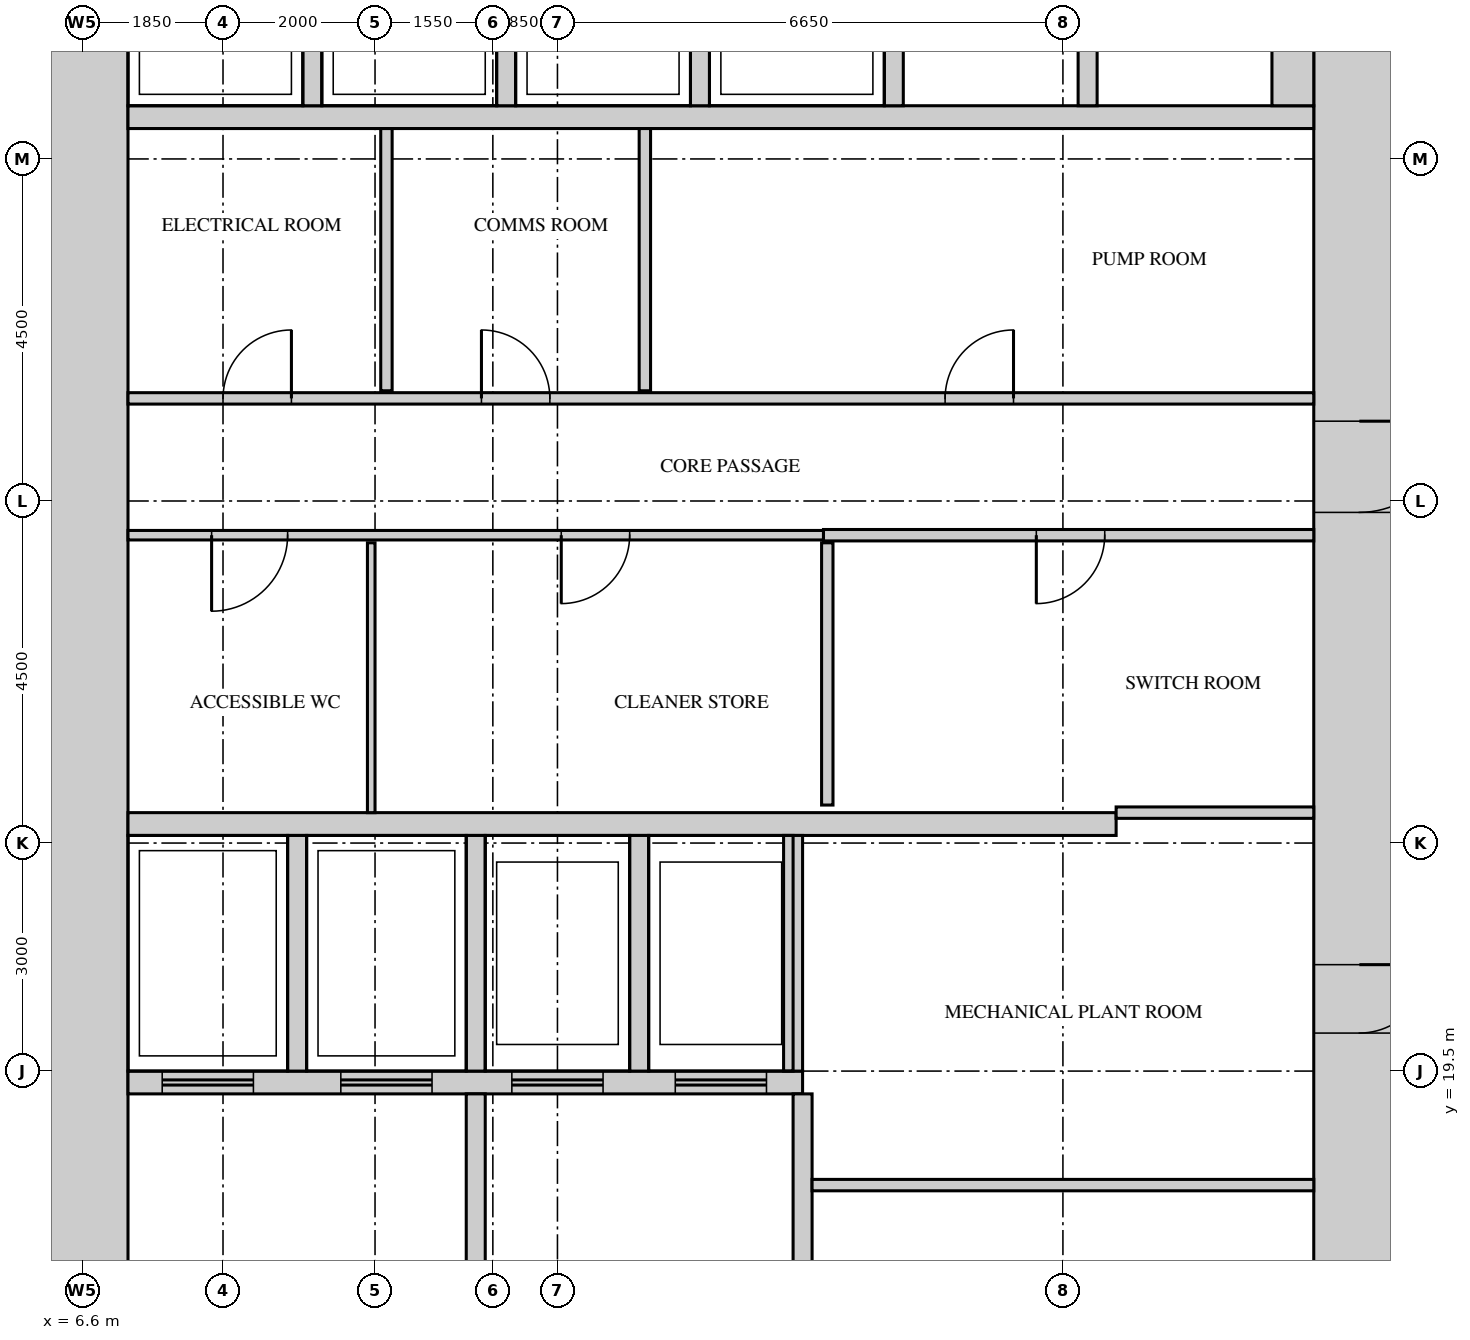
"""IFC4 building model, lengths in metres.
Left out: names, types, materials, properties, quantities, classifications, styles, units other than length and angle.
Written with IfcOpenShell. Run it as: python <this file> out.ifc"""

import sys

from ifc_helpers import new_model, si_unit, direction, frame, frame_2d, origin, place, context, subcontext, project, spatial, rectangle, extrude, source, transform, mapped, element, fill, save


model = new_model("IFC4")
c1 = context("Model", 3, precision=1e-05, world=origin(), true_north=direction((0.0, 1.0)))
c2 = subcontext(c1, "Body", "Model", "MODEL_VIEW")
j1 = project(units=[si_unit("LENGTHUNIT", "METRE"), si_unit("PLANEANGLEUNIT", "RADIAN")], contexts=[c1])
p1 = place(None, origin())
s1 = spatial("IfcSite", under=j1, at=p1, CompositionType="ELEMENT")
p2 = place(p1, origin())
s2 = spatial("IfcBuilding", under=s1, at=p2, CompositionType="ELEMENT")
p3 = place(p2, frame((0.0, 0.0, 33.0)))
s3 = spatial("IfcBuildingStorey", under=s2, at=p3, CompositionType="ELEMENT", Elevation=33.0)
m1 = source(origin(), c2, "Body", "SweptSolid", [
    extrude(rectangle(XDim=27.6, YDim=1.2, at=frame_2d((13.8, 0.0))), origin(), (0.0, 0.0, 1.0), 4.2),
])
p4 = place(p3, frame((23.4, 13.2, 0.0), z_axis=(0.0, 0.0, 1.0), x_axis=(0.0, 1.0, 0.0)))
e1 = element("IfcWall", 1, at=p4, inside=s3, PredefinedType="SHEAR", context=c2, shape_type="MappedRepresentation", body=[
    mapped(m1, transform((0.0, 0.0, 0.0))),
])
m2 = source(origin(), c2, "Body", "SweptSolid", [
    extrude(rectangle(XDim=1.8, YDim=2.1, at=frame_2d((0.9, 1.05))), frame((0.0, 0.61, 0.0), z_axis=(0.0, -1.0, 0.0), x_axis=(1.0, 0.0, 0.0)), (0.0, 0.0, 1.0), 1.22),
])
p5 = place(p4, frame((22.4, 0.0, 0.0)))
e2 = element("IfcOpeningElement", 2, at=p5, cuts=e1, PredefinedType="OPENING", context=c2, shape_type="MappedRepresentation", body=[
    mapped(m2, transform((0.0, 0.0, 0.0))),
])
m3 = source(origin(), c2, "Body", "SweptSolid", [
    extrude(rectangle(XDim=1.2, YDim=2.1, at=frame_2d((0.6, 1.05))), frame((0.0, 0.61, 0.0), z_axis=(0.0, -1.0, 0.0), x_axis=(1.0, 0.0, 0.0)), (0.0, 0.0, 1.0), 1.22),
])
p6 = place(p4, frame((13.65, 0.0, 0.0)))
e3 = element("IfcOpeningElement", 3, at=p6, cuts=e1, PredefinedType="OPENING", context=c2, shape_type="MappedRepresentation", body=[
    mapped(m3, transform((0.0, 0.0, 0.0))),
])
m4 = source(origin(), c2, "Body", "SweptSolid", [
    extrude(rectangle(XDim=0.9, YDim=2.1, at=frame_2d((0.45, 1.05))), frame((0.0, 0.61, 0.0), z_axis=(0.0, -1.0, 0.0), x_axis=(1.0, 0.0, 0.0)), (0.0, 0.0, 1.0), 1.22),
])
p7 = place(p4, frame((1.95, 0.0, 0.0)))
e4 = element("IfcOpeningElement", 4, at=p7, cuts=e1, PredefinedType="OPENING", context=c2, shape_type="MappedRepresentation", body=[
    mapped(m4, transform((0.0, 0.0, 0.0))),
])
p8 = place(p4, frame((6.8, 0.0, 0.0)))
e5 = element("IfcOpeningElement", 5, at=p8, cuts=e1, PredefinedType="OPENING", context=c2, shape_type="MappedRepresentation", body=[
    mapped(m4, transform((0.0, 0.0, 0.0))),
])
p9 = place(p3, frame((6.6, 13.2, 0.0), z_axis=(0.0, 0.0, 1.0), x_axis=(0.0, 1.0, 0.0)))
e6 = element("IfcWall", 6, at=p9, inside=s3, PredefinedType="SHEAR", context=c2, shape_type="MappedRepresentation", body=[
    mapped(m1, transform((0.0, 0.0, 0.0))),
])
m5 = source(origin(), c2, "Body", "SweptSolid", [
    extrude(rectangle(XDim=13.0, YDim=0.3, at=frame_2d((6.5, 0.0))), origin(), (0.0, 0.0, 1.0), 4.2),
])
p10 = place(p3, frame((7.2, 22.75, 0.0), z_axis=(0.0, 0.0, 1.0), x_axis=(1.0, 0.0, 0.0)))
e7 = element("IfcWall", 7, at=p10, inside=s3, PredefinedType="STANDARD", context=c2, shape_type="MappedRepresentation", body=[
    mapped(m5, transform((0.0, 0.0, 0.0))),
])
m6 = source(origin(), c2, "Body", "SweptSolid", [
    extrude(rectangle(XDim=8.875, YDim=0.3, at=frame_2d((4.438, 0.0))), origin(), (0.0, 0.0, 1.0), 4.2),
])
p11 = place(p3, frame((7.2, 19.35, 0.0), z_axis=(0.0, 0.0, 1.0), x_axis=(1.0, 0.0, 0.0)))
e8 = element("IfcWall", 8, at=p11, inside=s3, PredefinedType="STANDARD", context=c2, shape_type="MappedRepresentation", body=[
    mapped(m6, transform((0.0, 0.0, 0.0))),
])
m7 = source(origin(), c2, "Body", "SweptSolid", [
    extrude(rectangle(XDim=1.2, YDim=2.1, at=frame_2d((0.6, 1.05))), frame((0.0, 0.16, 0.0), z_axis=(0.0, -1.0, 0.0), x_axis=(1.0, 0.0, 0.0)), (0.0, 0.0, 1.0), 0.32),
])
p12 = place(p11, frame((0.45, 0.0, 0.0)))
e9 = element("IfcOpeningElement", 9, at=p12, cuts=e8, PredefinedType="OPENING", context=c2, shape_type="MappedRepresentation", body=[
    mapped(m7, transform((0.0, 0.0, 0.0))),
])
p13 = place(p11, frame((2.8, 0.0, 0.0)))
e10 = element("IfcOpeningElement", 10, at=p13, cuts=e8, PredefinedType="OPENING", context=c2, shape_type="MappedRepresentation", body=[
    mapped(m7, transform((0.0, 0.0, 0.0))),
])
p14 = place(p11, frame((5.05, 0.0, 0.0)))
e11 = element("IfcOpeningElement", 11, at=p14, cuts=e8, PredefinedType="OPENING", context=c2, shape_type="MappedRepresentation", body=[
    mapped(m7, transform((0.0, 0.0, 0.0))),
])
p15 = place(p11, frame((7.2, 0.0, 0.0)))
e12 = element("IfcOpeningElement", 12, at=p15, cuts=e8, PredefinedType="OPENING", context=c2, shape_type="MappedRepresentation", body=[
    mapped(m7, transform((0.0, 0.0, 0.0))),
])
m8 = source(origin(), c2, "Body", "SweptSolid", [
    extrude(rectangle(XDim=15.6, YDim=0.3, at=frame_2d((7.8, 0.0))), origin(), (0.0, 0.0, 1.0), 4.2),
])
p16 = place(p3, frame((7.2, 32.05, 0.0), z_axis=(0.0, 0.0, 1.0), x_axis=(1.0, 0.0, 0.0)))
e13 = element("IfcWall", 13, at=p16, inside=s3, PredefinedType="STANDARD", context=c2, shape_type="MappedRepresentation", body=[
    mapped(m8, transform((0.0, 0.0, 0.0))),
])
m9 = source(origin(), c2, "Body", "SweptSolid", [
    extrude(rectangle(XDim=3.1, YDim=0.25, at=frame_2d((1.55, 0.0))), origin(), (0.0, 0.0, 1.0), 4.2),
])
for number, where, z_axis, x_axis in (
    (14, (9.425, 19.5, 0.0), (0.0, 0.0, 1.0), (0.0, 1.0, 0.0)),
    (15, (11.775, 19.5, 0.0), (0.0, 0.0, 1.0), (0.0, 1.0, 0.0)),
    (16, (13.925, 19.5, 0.0), (0.0, 0.0, 1.0), (0.0, 1.0, 0.0)),
    (17, (15.95, 19.5, 0.0), (0.0, 0.0, 1.0), (0.0, 1.0, 0.0)),
):
    element("IfcWall", number, at=place(p3, frame(where, z_axis=z_axis, x_axis=x_axis)), inside=s3, PredefinedType="STANDARD", context=c2, shape_type="MappedRepresentation", body=[
        mapped(m9, transform((0.0, 0.0, 0.0))),
    ])
m10 = source(origin(), c2, "Body", "SweptSolid", [
    extrude(rectangle(XDim=2.4, YDim=0.25, at=frame_2d((1.2, 0.0))), origin(), (0.0, 0.0, 1.0), 4.2),
])
for number, where, z_axis, x_axis in (
    (18, (9.625, 32.2, 0.0), (0.0, 0.0, 1.0), (0.0, 1.0, 0.0)),
    (19, (12.175, 32.2, 0.0), (0.0, 0.0, 1.0), (0.0, 1.0, 0.0)),
    (20, (14.725, 32.2, 0.0), (0.0, 0.0, 1.0), (0.0, 1.0, 0.0)),
    (21, (17.275, 32.2, 0.0), (0.0, 0.0, 1.0), (0.0, 1.0, 0.0)),
    (22, (19.825, 32.2, 0.0), (0.0, 0.0, 1.0), (0.0, 1.0, 0.0)),
):
    element("IfcWall", number, at=place(p3, frame(where, z_axis=z_axis, x_axis=x_axis)), inside=s3, PredefinedType="STANDARD", context=c2, shape_type="MappedRepresentation", body=[
        mapped(m10, transform((0.0, 0.0, 0.0))),
    ])
m11 = source(origin(), c2, "Body", "SweptSolid", [
    extrude(rectangle(XDim=2.4, YDim=0.55, at=frame_2d((1.2, 0.0))), origin(), (0.0, 0.0, 1.0), 4.2),
])
p17 = place(p3, frame((22.525, 32.2, 0.0), z_axis=(0.0, 0.0, 1.0), x_axis=(0.0, 1.0, 0.0)))
e23 = element("IfcWall", 23, at=p17, inside=s3, PredefinedType="STANDARD", context=c2, shape_type="MappedRepresentation", body=[
    mapped(m11, transform((0.0, 0.0, 0.0))),
])
m12 = source(origin(), c2, "Body", "SweptSolid", [
    extrude(rectangle(XDim=3.4, YDim=0.25, at=frame_2d((1.7, 0.0))), origin(), (0.0, 0.0, 1.0), 4.2),
])
for number, where, z_axis, x_axis in (
    (24, (16.075, 15.8, 0.0), (0.0, 0.0, 1.0), (0.0, 1.0, 0.0)),
    (25, (11.775, 15.8, 0.0), (0.0, 0.0, 1.0), (0.0, 1.0, 0.0)),
):
    element("IfcWall", number, at=place(p3, frame(where, z_axis=z_axis, x_axis=x_axis)), inside=s3, PredefinedType="STANDARD", context=c2, shape_type="MappedRepresentation", body=[
        mapped(m12, transform((0.0, 0.0, 0.0))),
    ])
m13 = source(origin(), c2, "Body", "SweptSolid", [
    extrude(rectangle(XDim=6.6, YDim=0.15, at=frame_2d((3.3, 0.0))), origin(), (0.0, 0.0, 1.0), 4.3),
])
p18 = place(p3, frame((16.2, 18.0, 0.0), z_axis=(0.0, 0.0, 1.0), x_axis=(1.0, 0.0, 0.0)))
e26 = element("IfcWall", 26, at=p18, inside=s3, PredefinedType="PARTITIONING", context=c2, shape_type="MappedRepresentation", body=[
    mapped(m13, transform((0.0, 0.0, 0.0))),
])
m14 = source(origin(), c2, "Body", "SweptSolid", [
    extrude(rectangle(XDim=3.55, YDim=0.1, at=frame_2d((1.775, 0.0))), origin(), (0.0, 0.0, 1.0), 4.3),
])
p19 = place(p3, frame((10.4, 22.9, 0.0), z_axis=(0.0, 0.0, 1.0), x_axis=(0.0, 1.0, 0.0)))
e27 = element("IfcWall", 27, at=p19, inside=s3, PredefinedType="PARTITIONING", context=c2, shape_type="MappedRepresentation", body=[
    mapped(m14, transform((0.0, 0.0, 0.0))),
])
m15 = source(origin(), c2, "Body", "SweptSolid", [
    extrude(rectangle(XDim=2.6, YDim=0.15, at=frame_2d((1.3, 0.0))), origin(), (0.0, 0.0, 1.0), 4.3),
])
p20 = place(p3, frame((20.2, 22.9, 0.0), z_axis=(0.0, 0.0, 1.0), x_axis=(1.0, 0.0, 0.0)))
e28 = element("IfcWall", 28, at=p20, inside=s3, PredefinedType="PARTITIONING", context=c2, shape_type="MappedRepresentation", body=[
    mapped(m15, transform((0.0, 0.0, 0.0))),
])
m16 = source(origin(), c2, "Body", "SweptSolid", [
    extrude(rectangle(XDim=3.45, YDim=0.15, at=frame_2d((1.725, 0.0))), origin(), (0.0, 0.0, 1.0), 4.3),
])
p21 = place(p3, frame((16.4, 23.0, 0.0), z_axis=(0.0, 0.0, 1.0), x_axis=(0.0, 1.0, 0.0)))
e29 = element("IfcWall", 29, at=p21, inside=s3, PredefinedType="PARTITIONING", context=c2, shape_type="MappedRepresentation", body=[
    mapped(m16, transform((0.0, 0.0, 0.0))),
])
m17 = source(origin(), c2, "Body", "SweptSolid", [
    extrude(rectangle(XDim=9.15, YDim=0.125, at=frame_2d((4.575, 0.0))), origin(), (0.0, 0.0, 1.0), 4.3),
])
p22 = place(p3, frame((7.2, 26.55, 0.0), z_axis=(0.0, 0.0, 1.0), x_axis=(1.0, 0.0, 0.0)))
e30 = element("IfcWall", 30, at=p22, inside=s3, PredefinedType="PARTITIONING", context=c2, shape_type="MappedRepresentation", body=[
    mapped(m17, transform((0.0, 0.0, 0.0))),
])
m18 = source(origin(), c2, "Body", "SweptSolid", [
    extrude(rectangle(XDim=1.0, YDim=2.1, at=frame_2d((0.5, 1.05))), frame((0.0, 0.073, 0.0), z_axis=(0.0, -1.0, 0.0), x_axis=(1.0, 0.0, 0.0)), (0.0, 0.0, 1.0), 0.145),
])
p23 = place(p22, frame((1.1, 0.0, 0.0)))
e31 = element("IfcOpeningElement", 31, at=p23, cuts=e30, PredefinedType="OPENING", context=c2, shape_type="MappedRepresentation", body=[
    mapped(m18, transform((0.0, 0.0, 0.0))),
])
m19 = source(origin(), c2, "Body", "SweptSolid", [
    extrude(rectangle(XDim=0.9, YDim=2.1, at=frame_2d((0.45, 1.05))), frame((0.0, 0.073, 0.0), z_axis=(0.0, -1.0, 0.0), x_axis=(1.0, 0.0, 0.0)), (0.0, 0.0, 1.0), 0.145),
])
p24 = place(p22, frame((5.7, 0.0, 0.0)))
e32 = element("IfcOpeningElement", 32, at=p24, cuts=e30, PredefinedType="OPENING", context=c2, shape_type="MappedRepresentation", body=[
    mapped(m19, transform((0.0, 0.0, 0.0))),
])
m20 = source(origin(), c2, "Body", "SweptSolid", [
    extrude(rectangle(XDim=6.45, YDim=0.15, at=frame_2d((3.225, 0.0))), origin(), (0.0, 0.0, 1.0), 4.3),
])
p25 = place(p3, frame((16.35, 26.55, 0.0), z_axis=(0.0, 0.0, 1.0), x_axis=(1.0, 0.0, 0.0)))
e33 = element("IfcWall", 33, at=p25, inside=s3, PredefinedType="PARTITIONING", context=c2, shape_type="MappedRepresentation", body=[
    mapped(m20, transform((0.0, 0.0, 0.0))),
])
m21 = source(origin(), c2, "Body", "SweptSolid", [
    extrude(rectangle(XDim=0.9, YDim=2.1, at=frame_2d((0.45, 1.05))), frame((0.0, 0.085, 0.0), z_axis=(0.0, -1.0, 0.0), x_axis=(1.0, 0.0, 0.0)), (0.0, 0.0, 1.0), 0.17),
])
p26 = place(p25, frame((2.8, 0.0, 0.0)))
e34 = element("IfcOpeningElement", 34, at=p26, cuts=e33, PredefinedType="OPENING", context=c2, shape_type="MappedRepresentation", body=[
    mapped(m21, transform((0.0, 0.0, 0.0))),
])
m22 = source(origin(), c2, "Body", "SweptSolid", [
    extrude(rectangle(XDim=15.6, YDim=0.15, at=frame_2d((7.8, 0.0))), origin(), (0.0, 0.0, 1.0), 4.3),
])
p27 = place(p3, frame((7.2, 28.35, 0.0), z_axis=(0.0, 0.0, 1.0), x_axis=(1.0, 0.0, 0.0)))
e35 = element("IfcWall", 35, at=p27, inside=s3, PredefinedType="PARTITIONING", context=c2, shape_type="MappedRepresentation", body=[
    mapped(m22, transform((0.0, 0.0, 0.0))),
])
p28 = place(p27, frame((1.25, 0.0, 0.0)))
e36 = element("IfcOpeningElement", 36, at=p28, cuts=e35, PredefinedType="OPENING", context=c2, shape_type="MappedRepresentation", body=[
    mapped(m21, transform((0.0, 0.0, 0.0))),
])
p29 = place(p27, frame((4.65, 0.0, 0.0)))
e37 = element("IfcOpeningElement", 37, at=p29, cuts=e35, PredefinedType="OPENING", context=c2, shape_type="MappedRepresentation", body=[
    mapped(m21, transform((0.0, 0.0, 0.0))),
])
p30 = place(p27, frame((10.75, 0.0, 0.0)))
e38 = element("IfcOpeningElement", 38, at=p30, cuts=e35, PredefinedType="OPENING", context=c2, shape_type="MappedRepresentation", body=[
    mapped(m21, transform((0.0, 0.0, 0.0))),
])
for number, where, z_axis, x_axis in (
    (39, (10.6, 28.45, 0.0), (0.0, 0.0, 1.0), (0.0, 1.0, 0.0)),
    (40, (14.0, 28.45, 0.0), (0.0, 0.0, 1.0), (0.0, 1.0, 0.0)),
):
    element("IfcWall", number, at=place(p3, frame(where, z_axis=z_axis, x_axis=x_axis)), inside=s3, PredefinedType="PARTITIONING", context=c2, shape_type="MappedRepresentation", body=[
        mapped(m16, transform((0.0, 0.0, 0.0))),
    ])
m23 = source(origin(), c2, "Body", "SweptSolid", [
    extrude(rectangle(XDim=1.2, YDim=2.1, at=frame_2d((0.6, 1.05))), frame((0.0, 0.55, 0.0), z_axis=(0.0, -1.0, 0.0), x_axis=(1.0, 0.0, 0.0)), (0.0, 0.0, 1.0), 1.1),
])
p31 = place(p6, origin())
e41 = element("IfcDoor", 41, at=p31, inside=s3, OperationType="SINGLE_SWING_RIGHT", PredefinedType="DOOR", context=c2, shape_type="MappedRepresentation", body=[
    mapped(m23, transform((0.0, 0.0, 0.0))),
])
fill(e3, e41)
m24 = source(origin(), c2, "Body", "SweptSolid", [
    extrude(rectangle(XDim=0.9, YDim=2.1, at=frame_2d((0.45, 1.05))), frame((0.0, 0.025, 0.0), z_axis=(0.0, -1.0, 0.0), x_axis=(1.0, 0.0, 0.0)), (0.0, 0.0, 1.0), 0.05),
])
p32 = place(p28, origin())
e42 = element("IfcDoor", 42, at=p32, inside=s3, OperationType="SINGLE_SWING_LEFT", PredefinedType="DOOR", context=c2, shape_type="MappedRepresentation", body=[
    mapped(m24, transform((0.0, 0.0, 0.0))),
])
fill(e36, e42)
p33 = place(p29, origin())
e43 = element("IfcDoor", 43, at=p33, inside=s3, OperationType="SINGLE_SWING_RIGHT", PredefinedType="DOOR", context=c2, shape_type="MappedRepresentation", body=[
    mapped(m24, transform((0.0, 0.0, 0.0))),
])
fill(e37, e43)
p34 = place(p30, origin())
e44 = element("IfcDoor", 44, at=p34, inside=s3, OperationType="SINGLE_SWING_LEFT", PredefinedType="DOOR", context=c2, shape_type="MappedRepresentation", body=[
    mapped(m24, transform((0.0, 0.0, 0.0))),
])
fill(e38, e44)
m25 = source(origin(), c2, "Body", "SweptSolid", [
    extrude(rectangle(XDim=1.0, YDim=2.1, at=frame_2d((0.5, 1.05))), frame((0.0, 0.025, 0.0), z_axis=(0.0, -1.0, 0.0), x_axis=(1.0, 0.0, 0.0)), (0.0, 0.0, 1.0), 0.05),
])
p35 = place(p23, origin())
e45 = element("IfcDoor", 45, at=p35, inside=s3, OperationType="SINGLE_SWING_LEFT", PredefinedType="DOOR", context=c2, shape_type="MappedRepresentation", body=[
    mapped(m25, transform((0.0, 0.0, 0.0))),
])
fill(e31, e45)
p36 = place(p24, origin())
e46 = element("IfcDoor", 46, at=p36, inside=s3, OperationType="SINGLE_SWING_LEFT", PredefinedType="DOOR", context=c2, shape_type="MappedRepresentation", body=[
    mapped(m24, transform((0.0, 0.0, 0.0))),
])
fill(e32, e46)
p37 = place(p26, origin())
e47 = element("IfcDoor", 47, at=p37, inside=s3, OperationType="SINGLE_SWING_LEFT", PredefinedType="DOOR", context=c2, shape_type="MappedRepresentation", body=[
    mapped(m24, transform((0.0, 0.0, 0.0))),
])
fill(e34, e47)
m26 = source(origin(), c2, "Body", "SweptSolid", [
    extrude(rectangle(XDim=0.9, YDim=2.1, at=frame_2d((0.45, 1.05))), frame((0.0, 0.55, 0.0), z_axis=(0.0, -1.0, 0.0), x_axis=(1.0, 0.0, 0.0)), (0.0, 0.0, 1.0), 1.1),
])
p38 = place(p8, origin())
e48 = element("IfcDoor", 48, at=p38, inside=s3, OperationType="SINGLE_SWING_RIGHT", PredefinedType="DOOR", context=c2, shape_type="MappedRepresentation", body=[
    mapped(m26, transform((0.0, 0.0, 0.0))),
])
fill(e5, e48)
m27 = source(origin(), c2, "Body", "SweptSolid", [
    extrude(rectangle(XDim=1.2, YDim=2.1, at=frame_2d((0.6, 1.05))), frame((0.0, 0.025, 0.0), z_axis=(0.0, -1.0, 0.0), x_axis=(1.0, 0.0, 0.0)), (0.0, 0.0, 1.0), 0.05),
])
p39 = place(p12, origin())
e49 = element("IfcDoor", 49, at=p39, inside=s3, OperationType="DOUBLE_DOOR_SLIDING", PredefinedType="DOOR", context=c2, shape_type="MappedRepresentation", body=[
    mapped(m27, transform((0.0, 0.0, 0.0))),
])
fill(e9, e49)
p40 = place(p13, origin())
e50 = element("IfcDoor", 50, at=p40, inside=s3, OperationType="DOUBLE_DOOR_SLIDING", PredefinedType="DOOR", context=c2, shape_type="MappedRepresentation", body=[
    mapped(m27, transform((0.0, 0.0, 0.0))),
])
fill(e10, e50)
p41 = place(p14, origin())
e51 = element("IfcDoor", 51, at=p41, inside=s3, OperationType="DOUBLE_DOOR_SLIDING", PredefinedType="DOOR", context=c2, shape_type="MappedRepresentation", body=[
    mapped(m27, transform((0.0, 0.0, 0.0))),
])
fill(e11, e51)
p42 = place(p15, origin())
e52 = element("IfcDoor", 52, at=p42, inside=s3, OperationType="DOUBLE_DOOR_SLIDING", PredefinedType="DOOR", context=c2, shape_type="MappedRepresentation", body=[
    mapped(m27, transform((0.0, 0.0, 0.0))),
])
fill(e12, e52)
save(model, sys.argv[1])
